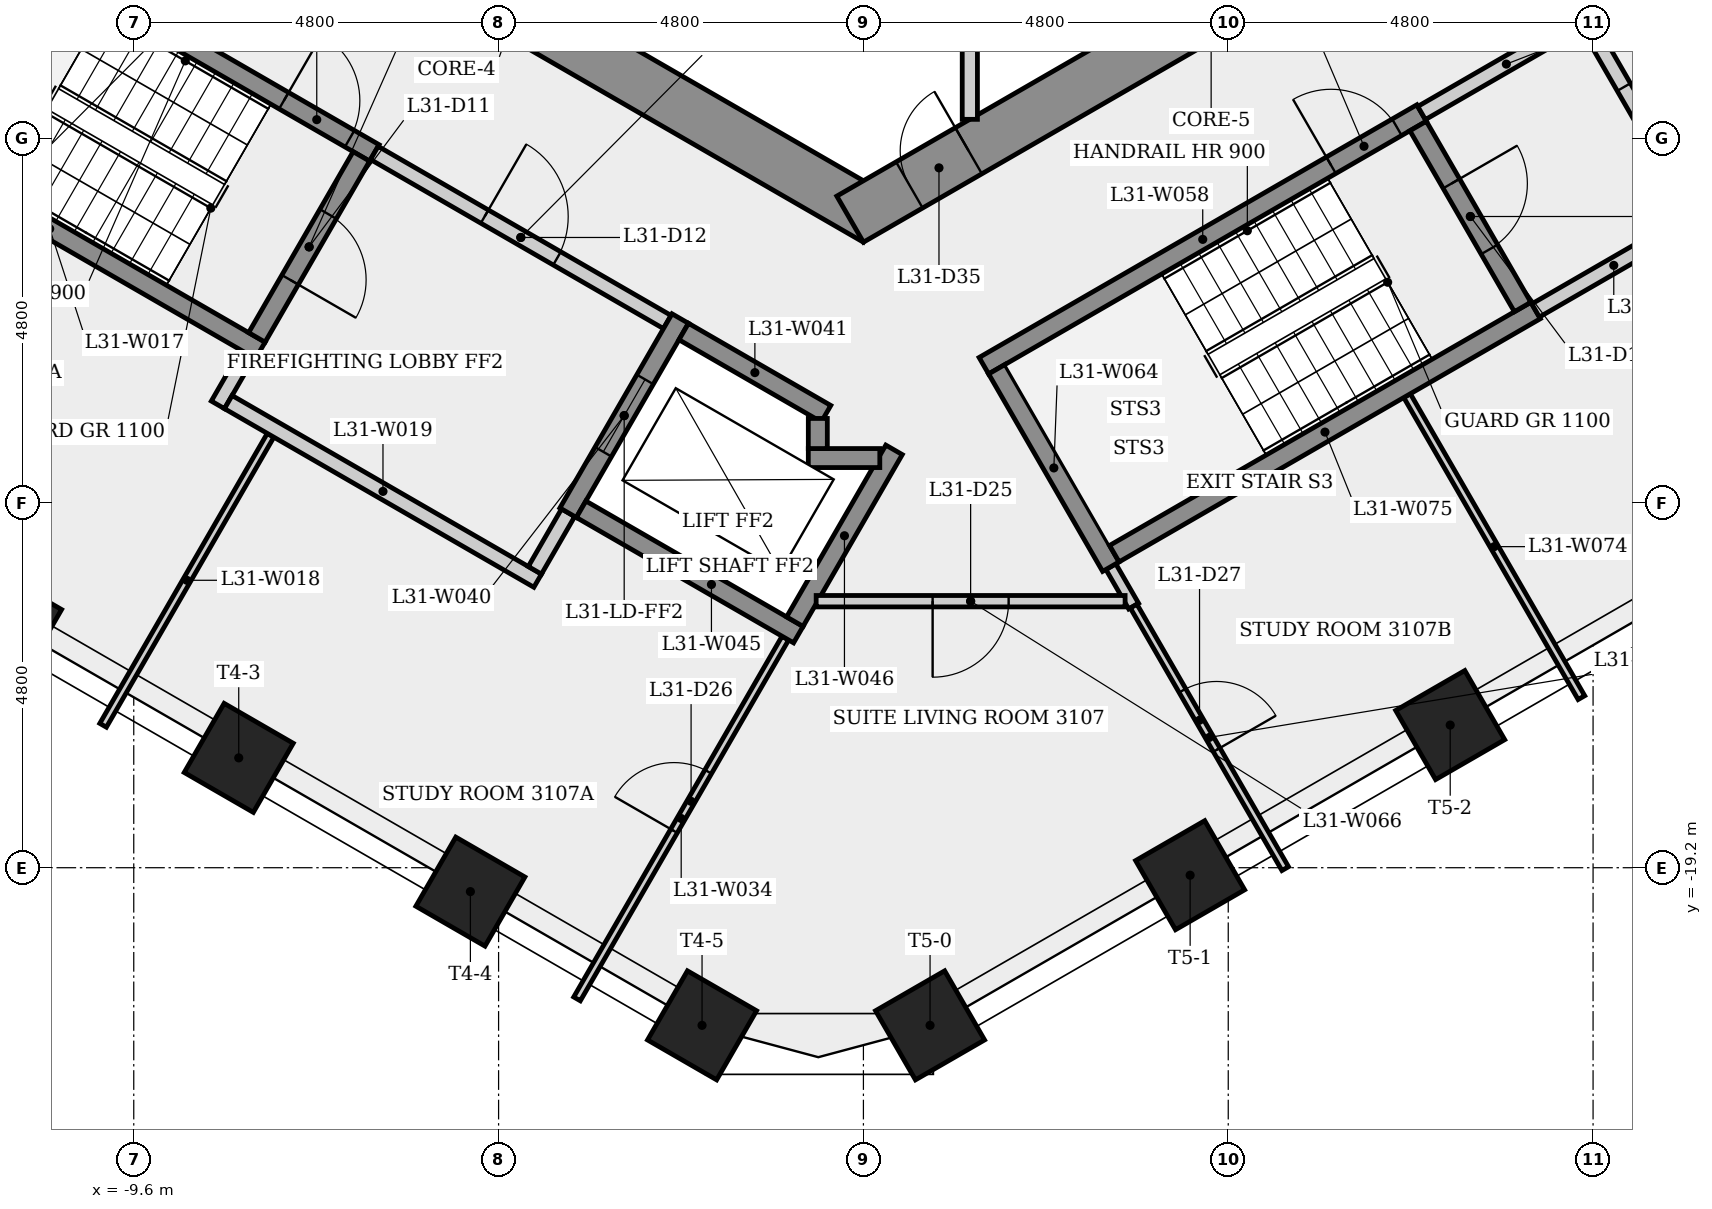
"""IFC4 building model, lengths in metres.
Left out: names, types, materials, properties, quantities, classifications, styles, units other than length and angle.
Written with IfcOpenShell. Run it as: python <this file> out.ifc"""

import sys

from ifc_helpers import new_model, si_unit, direction, frame, frame_2d, origin, origin_2d, place, context, subcontext, project, spatial, rectangle, extrude, element, fill, save


model = new_model("IFC4")
c1 = context("Model", 3, precision=1e-05, world=origin(), true_north=direction((0.0, 1.0)))
c2 = subcontext(c1, "Body", "Model", "MODEL_VIEW")
j1 = project(units=[si_unit("LENGTHUNIT", "METRE"), si_unit("PLANEANGLEUNIT", "RADIAN")], contexts=[c1])
p1 = place(None, origin())
s1 = spatial("IfcSite", under=j1, at=p1, CompositionType="ELEMENT")
p2 = place(p1, origin())
s2 = spatial("IfcBuilding", under=s1, at=p2, CompositionType="ELEMENT")
p3 = place(p2, frame((0.0, 0.0, 117.1)))
s3 = spatial("IfcBuildingStorey", under=s2, at=p3, CompositionType="ELEMENT", Elevation=117.1)
p4 = place(p3, frame((-9.325, -5.182, 0.0), z_axis=(0.0, 0.0, 1.0), x_axis=(0.866023993627, -0.500002442456, 0.0)))
e1 = element("IfcWall", 1, at=p4, inside=s3, PredefinedType="SHEAR", context=c2, shape_type="SweptSolid", body=[
    extrude(rectangle(XDim=10.97, YDim=0.7, at=frame_2d((5.485, 0.0))), origin(), (0.0, 0.0, 1.0), 3.4),
])
p5 = place(p4, frame((0.801, 0.0, 0.0)))
e2 = element("IfcOpeningElement", 2, at=p5, cuts=e1, PredefinedType="OPENING", context=c2, shape_type="SweptSolid", body=[
    extrude(rectangle(XDim=0.9, YDim=2.1, at=frame_2d((0.45, 1.05))), frame((0.0, 0.36, 0.0), z_axis=(0.0, -1.0, 0.0), x_axis=(1.0, 0.0, 0.0)), (0.0, 0.0, 1.0), 0.72),
])
p6 = place(p3, frame((-0.175, -10.667, 0.0), z_axis=(0.0, 0.0, 1.0), x_axis=(0.866023993627, 0.500002442456, 0.0)))
e3 = element("IfcWall", 3, at=p6, inside=s3, PredefinedType="SHEAR", context=c2, shape_type="SweptSolid", body=[
    extrude(rectangle(XDim=10.97, YDim=0.7, at=frame_2d((5.485, 0.0))), origin(), (0.0, 0.0, 1.0), 3.4),
])
p7 = place(p6, frame((0.9, 0.0, 0.0)))
e4 = element("IfcOpeningElement", 4, at=p7, cuts=e3, PredefinedType="OPENING", context=c2, shape_type="SweptSolid", body=[
    extrude(rectangle(XDim=0.9, YDim=2.1, at=frame_2d((0.45, 1.05))), frame((0.0, 0.36, 0.0), z_axis=(0.0, -1.0, 0.0), x_axis=(1.0, 0.0, 0.0)), (0.0, 0.0, 1.0), 0.72),
])
p8 = place(p6, frame((7.483, 0.0, 0.0)))
e5 = element("IfcOpeningElement", 5, at=p8, cuts=e3, PredefinedType="OPENING", context=c2, shape_type="SweptSolid", body=[
    extrude(rectangle(XDim=0.9, YDim=2.1, at=frame_2d((0.45, 1.05))), frame((0.0, 0.36, 0.0), z_axis=(0.0, -1.0, 0.0), x_axis=(1.0, 0.0, 0.0)), (0.0, 0.0, 1.0), 0.72),
])
for number, where, z_axis, x_axis in (
    (6, (-11.267, -15.995, 0.0), (0.0, 0.0, 1.0), (-0.5, -0.866, 0.0)),
    (7, (-8.219, -17.755, 0.0), (0.0, 0.0, 1.0), (-0.5, -0.866, 0.0)),
    (8, (-5.171, -19.514, 0.0), (0.0, 0.0, 1.0), (-0.5, -0.866, 0.0)),
    (9, (-2.123, -21.274, 0.0), (0.0, 0.0, 1.0), (-0.5, -0.866, 0.0)),
    (10, (0.877, -21.274, 0.0), (0.0, 0.0, 1.0), (0.5, -0.866, 0.0)),
    (11, (4.299, -19.299, 0.0), (0.0, 0.0, 1.0), (0.5, -0.866, 0.0)),
    (12, (7.72, -17.323, 0.0), (0.0, 0.0, 1.0), (0.5, -0.866, 0.0)),
):
    element("IfcColumn", number, at=place(p3, frame(where, z_axis=z_axis, x_axis=x_axis)), inside=s3, PredefinedType="COLUMN", context=c2, shape_type="SweptSolid", body=[
        extrude(rectangle(XDim=1.05, YDim=1.05, at=origin_2d()), origin(), (0.0, 0.0, 1.0), 3.4),
    ])
p9 = place(p3, frame((-11.977, -6.595, 0.0), z_axis=(0.0, 0.0, 1.0), x_axis=(0.866025499775, -0.499999833739, 0.0)))
e13 = element("IfcWall", 13, at=p9, inside=s3, PredefinedType="SHEAR", context=c2, shape_type="SweptSolid", body=[
    extrude(rectangle(XDim=6.4, YDim=0.25, at=frame_2d((3.2, 0.0))), origin(), (0.0, 0.0, 1.0), 3.0),
])
p10 = place(p9, frame((5.025, 0.0, 0.0)))
e14 = element("IfcOpeningElement", 14, at=p10, cuts=e13, PredefinedType="OPENING", context=c2, shape_type="SweptSolid", body=[
    extrude(rectangle(XDim=1.0, YDim=2.1, at=frame_2d((0.5, 1.05))), frame((0.0, 0.135, 0.0), z_axis=(0.0, -1.0, 0.0), x_axis=(1.0, 0.0, 0.0)), (0.0, 0.0, 1.0), 0.27),
])
p11 = place(p3, frame((-8.493, -13.11, 0.0), z_axis=(0.0, 0.0, 1.0), x_axis=(0.500067724834, 0.865986299303, 0.0)))
e15 = element("IfcWall", 15, at=p11, inside=s3, PredefinedType="PARTITIONING", context=c2, shape_type="SweptSolid", body=[
    extrude(rectangle(XDim=0.775, YDim=0.2, at=frame_2d((0.388, 0.0))), origin(), (0.0, 0.0, 1.0), 3.0),
])
p12 = place(p3, frame((-7.935, -12.393, 0.0), z_axis=(0.0, 0.0, 1.0), x_axis=(-0.866025499775, 0.499999833739, 0.0)))
e16 = element("IfcWall", 16, at=p12, inside=s3, PredefinedType="SHEAR", context=c2, shape_type="SweptSolid", body=[
    extrude(rectangle(XDim=6.4, YDim=0.25, at=frame_2d((3.2, 0.0))), origin(), (0.0, 0.0, 1.0), 3.0),
])
p13 = place(p3, frame((-7.8, -13.51, 0.0), z_axis=(0.0, 0.0, 1.0), x_axis=(-0.5000181976, -0.86601489714, 0.0)))
e17 = element("IfcWall", 17, at=p13, inside=s3, PredefinedType="PARTITIONING", context=c2, shape_type="SweptSolid", body=[
    extrude(rectangle(XDim=4.406, YDim=0.1, at=frame_2d((2.203, 0.0))), origin(), (0.0, 0.0, 1.0), 3.0),
])
p14 = place(p3, frame((-8.356, -13.073, 0.0), z_axis=(0.0, 0.0, 1.0), x_axis=(0.866038532462, -0.499977259774, 0.0)))
e18 = element("IfcWall", 18, at=p14, inside=s3, PredefinedType="PARTITIONING", context=c2, shape_type="SweptSolid", body=[
    extrude(rectangle(XDim=4.7, YDim=0.2, at=frame_2d((2.35, 0.0))), origin(), (0.0, 0.0, 1.0), 3.0),
])
p15 = place(p3, frame((-6.605, -9.841, 0.0), z_axis=(0.0, 0.0, 1.0), x_axis=(-0.499996545922, -0.866027397988, 0.0)))
e19 = element("IfcWall", 19, at=p15, inside=s3, PredefinedType="SHEAR", context=c2, shape_type="SweptSolid", body=[
    extrude(rectangle(XDim=2.75, YDim=0.25, at=frame_2d((1.375, 0.0))), origin(), (0.0, 0.0, 1.0), 3.0),
])
p16 = place(p15, frame((0.875, 0.0, 0.0)))
e20 = element("IfcOpeningElement", 20, at=p16, cuts=e19, PredefinedType="OPENING", context=c2, shape_type="SweptSolid", body=[
    extrude(rectangle(XDim=1.0, YDim=2.1, at=frame_2d((0.5, 1.05))), frame((0.0, 0.135, 0.0), z_axis=(0.0, -1.0, 0.0), x_axis=(1.0, 0.0, 0.0)), (0.0, 0.0, 1.0), 0.27),
])
p17 = place(p3, frame((-6.435, -9.795, 0.0), z_axis=(0.0, 0.0, 1.0), x_axis=(0.866012907634, -0.500021643343, 0.0)))
e21 = element("IfcWall", 21, at=p17, inside=s3, PredefinedType="PARTITIONING", context=c2, shape_type="SweptSolid", body=[
    extrude(rectangle(XDim=4.45, YDim=0.2, at=frame_2d((2.225, 0.0))), origin(), (0.0, 0.0, 1.0), 3.0),
])
p18 = place(p17, frame((1.675, 0.0, 0.0)))
e22 = element("IfcOpeningElement", 22, at=p18, cuts=e21, PredefinedType="OPENING", context=c2, shape_type="SweptSolid", body=[
    extrude(rectangle(XDim=1.1, YDim=2.1, at=frame_2d((0.55, 1.05))), frame((0.0, 0.11, 0.0), z_axis=(0.0, -1.0, 0.0), x_axis=(1.0, 0.0, 0.0)), (0.0, 0.0, 1.0), 0.22),
])
p19 = place(p3, frame((-3.885, -14.529, 0.0), z_axis=(0.0, 0.0, 1.0), x_axis=(-0.499859285417, -0.866106630146, 0.0)))
e23 = element("IfcWall", 23, at=p19, inside=s3, PredefinedType="PARTITIONING", context=c2, shape_type="SweptSolid", body=[
    extrude(rectangle(XDim=0.875, YDim=0.2, at=frame_2d((0.438, 0.0))), origin(), (0.0, 0.0, 1.0), 3.0),
])
p20 = place(p3, frame((-3.768, -20.926, 0.0), z_axis=(0.0, 0.0, 1.0), x_axis=(0.499980760091, 0.866036511666, 0.0)))
e24 = element("IfcWall", 24, at=p20, inside=s3, PredefinedType="PARTITIONING", context=c2, shape_type="SweptSolid", body=[
    extrude(rectangle(XDim=5.482, YDim=0.1, at=frame_2d((2.741, 0.0))), origin(), (0.0, 0.0, 1.0), 3.0),
])
p21 = place(p20, frame((2.551, 0.0, 0.0)))
e25 = element("IfcOpeningElement", 25, at=p21, cuts=e24, PredefinedType="OPENING", context=c2, shape_type="SweptSolid", body=[
    extrude(rectangle(XDim=0.9, YDim=2.1, at=frame_2d((0.45, 1.05))), frame((0.0, 0.06, 0.0), z_axis=(0.0, -1.0, 0.0), x_axis=(1.0, 0.0, 0.0)), (0.0, 0.0, 1.0), 0.12),
])
p22 = place(p3, frame((-2.41, -11.974, 0.0), z_axis=(0.0, 0.0, 1.0), x_axis=(-0.500001826776, -0.866024349092, 0.0)))
e26 = element("IfcWall", 26, at=p22, inside=s3, PredefinedType="SHEAR", context=c2, shape_type="SweptSolid", body=[
    extrude(rectangle(XDim=2.95, YDim=0.25, at=frame_2d((1.475, 0.0))), origin(), (0.0, 0.0, 1.0), 3.0),
])
p23 = place(p22, frame((0.925, 0.0, 0.0)))
e27 = element("IfcOpeningElement", 27, at=p23, cuts=e26, PredefinedType="OPENING", context=c2, shape_type="SweptSolid", body=[
    extrude(rectangle(XDim=1.1, YDim=2.1, at=frame_2d((0.55, 1.05))), frame((0.0, 0.135, 0.0), z_axis=(0.0, -1.0, 0.0), x_axis=(1.0, 0.0, 0.0)), (0.0, 0.0, 1.0), 0.27),
])
p24 = place(p3, frame((-2.364, -12.145, 0.0), z_axis=(0.0, 0.0, 1.0), x_axis=(0.86603892542, -0.499976579108, 0.0)))
e28 = element("IfcWall", 28, at=p24, inside=s3, PredefinedType="SHEAR", context=c2, shape_type="SweptSolid", body=[
    extrude(rectangle(XDim=2.162, YDim=0.25, at=frame_2d((1.081, 0.0))), origin(), (0.0, 0.0, 1.0), 3.0),
])
p25 = place(p3, frame((-0.856, -16.133, 0.0), z_axis=(0.0, 0.0, 1.0), x_axis=(-0.866021716278, 0.500006386895, 0.0)))
e29 = element("IfcWall", 29, at=p25, inside=s3, PredefinedType="SHEAR", context=c2, shape_type="SweptSolid", body=[
    extrude(rectangle(XDim=3.3, YDim=0.25, at=frame_2d((1.65, 0.0))), origin(), (0.0, 0.0, 1.0), 3.0),
])
p26 = place(p3, frame((-0.902, -15.962, 0.0), z_axis=(0.0, 0.0, 1.0), x_axis=(0.499981517636, 0.866036074319, 0.0)))
e30 = element("IfcWall", 30, at=p26, inside=s3, PredefinedType="SHEAR", context=c2, shape_type="SweptSolid", body=[
    extrude(rectangle(XDim=2.61, YDim=0.25, at=frame_2d((1.305, 0.0))), origin(), (0.0, 0.0, 1.0), 3.0),
])
p27 = place(p3, frame((-0.725, -13.81, 0.0), z_axis=(0.0, 0.0, 1.0), x_axis=(1.0, 0.0, 0.0)))
e31 = element("IfcWall", 31, at=p27, inside=s3, PredefinedType="SHEAR", context=c2, shape_type="SweptSolid", body=[
    extrude(rectangle(XDim=0.941, YDim=0.25, at=frame_2d((0.47, 0.0))), origin(), (0.0, 0.0, 1.0), 3.4),
])
p28 = place(p3, frame((-0.6, -13.289, 0.0), z_axis=(0.0, 0.0, 1.0), x_axis=(0.0, -1.0, 0.0)))
e32 = element("IfcWall", 32, at=p28, inside=s3, PredefinedType="SHEAR", context=c2, shape_type="SweptSolid", body=[
    extrude(rectangle(XDim=0.396, YDim=0.25, at=frame_2d((0.198, 0.0))), origin(), (0.0, 0.0, 1.0), 3.4),
])
p29 = place(p3, frame((1.4, -5.275, 0.0), z_axis=(0.0, 0.0, 1.0), x_axis=(0.0, -1.0, 0.0)))
e33 = element("IfcWall", 33, at=p29, inside=s3, PredefinedType="PARTITIONING", context=c2, shape_type="SweptSolid", body=[
    extrude(rectangle(XDim=4.078, YDim=0.2, at=frame_2d((2.039, 0.0))), origin(), (0.0, 0.0, 1.0), 3.0),
])
p30 = place(p3, frame((1.585, -12.595, 0.0), z_axis=(0.0, 0.0, 1.0), x_axis=(0.866036417653, 0.499980922934, 0.0)))
e34 = element("IfcWall", 34, at=p30, inside=s3, PredefinedType="SHEAR", context=c2, shape_type="SweptSolid", body=[
    extrude(rectangle(XDim=6.65, YDim=0.25, at=frame_2d((3.325, 0.0))), origin(), (0.0, 0.0, 1.0), 3.0),
])
p31 = place(p30, frame((5.275, 0.0, 0.0)))
e35 = element("IfcOpeningElement", 35, at=p31, cuts=e34, PredefinedType="OPENING", context=c2, shape_type="SweptSolid", body=[
    extrude(rectangle(XDim=1.0, YDim=2.1, at=frame_2d((0.5, 1.05))), frame((0.0, 0.135, 0.0), z_axis=(0.0, -1.0, 0.0), x_axis=(1.0, 0.0, 0.0)), (0.0, 0.0, 1.0), 0.27),
])
p32 = place(p3, frame((3.256, -15.239, 0.0), z_axis=(0.0, 0.0, 1.0), x_axis=(0.499816412211, -0.866131372301, 0.0)))
e36 = element("IfcWall", 36, at=p32, inside=s3, PredefinedType="PARTITIONING", context=c2, shape_type="SweptSolid", body=[
    extrude(rectangle(XDim=0.6, YDim=0.15, at=frame_2d((0.3, 0.0))), origin(), (0.0, 0.0, 1.0), 3.0),
])
p33 = place(p3, frame((3.256, -15.239, 0.0), z_axis=(0.0, 0.0, 1.0), x_axis=(-0.50002537861, 0.866010750942, 0.0)))
e37 = element("IfcWall", 37, at=p33, inside=s3, PredefinedType="SHEAR", context=c2, shape_type="SweptSolid", body=[
    extrude(rectangle(XDim=3.0, YDim=0.25, at=frame_2d((1.5, 0.0))), origin(), (0.0, 0.0, 1.0), 3.0),
])
p34 = place(p3, frame((3.443, -15.693, 0.0), z_axis=(0.0, 0.0, 1.0), x_axis=(-1.0, 0.0, 0.0)))
e38 = element("IfcWall", 38, at=p34, inside=s3, PredefinedType="PARTITIONING", context=c2, shape_type="SweptSolid", body=[
    extrude(rectangle(XDim=4.064, YDim=0.15, at=frame_2d((2.032, 0.0))), origin(), (0.0, 0.0, 1.0), 3.0),
])
p35 = place(p34, frame((1.532, 0.0, 0.0)))
e39 = element("IfcOpeningElement", 39, at=p35, cuts=e38, PredefinedType="OPENING", context=c2, shape_type="SweptSolid", body=[
    extrude(rectangle(XDim=1.0, YDim=2.1, at=frame_2d((0.5, 1.05))), frame((0.0, 0.085, 0.0), z_axis=(0.0, -1.0, 0.0), x_axis=(1.0, 0.0, 0.0)), (0.0, 0.0, 1.0), 0.17),
])
p36 = place(p3, frame((3.555, -15.758, 0.0), z_axis=(0.0, 0.0, 1.0), x_axis=(0.500010364181, -0.866019419939, 0.0)))
e40 = element("IfcWall", 40, at=p36, inside=s3, PredefinedType="PARTITIONING", context=c2, shape_type="SweptSolid", body=[
    extrude(rectangle(XDim=3.988, YDim=0.1, at=frame_2d((1.994, 0.0))), origin(), (0.0, 0.0, 1.0), 3.0),
])
p37 = place(p36, frame((1.284, 0.0, 0.0)))
e41 = element("IfcOpeningElement", 41, at=p37, cuts=e40, PredefinedType="OPENING", context=c2, shape_type="SweptSolid", body=[
    extrude(rectangle(XDim=0.9, YDim=2.1, at=frame_2d((0.45, 1.05))), frame((0.0, 0.06, 0.0), z_axis=(0.0, -1.0, 0.0), x_axis=(1.0, 0.0, 0.0)), (0.0, 0.0, 1.0), 0.12),
])
p38 = place(p3, frame((7.153, -12.989, 0.0), z_axis=(0.0, 0.0, 1.0), x_axis=(0.500024917322, -0.866011017284, 0.0)))
e42 = element("IfcWall", 42, at=p38, inside=s3, PredefinedType="PARTITIONING", context=c2, shape_type="SweptSolid", body=[
    extrude(rectangle(XDim=4.588, YDim=0.1, at=frame_2d((2.294, 0.0))), origin(), (0.0, 0.0, 1.0), 3.0),
])
p39 = place(p3, frame((3.301, -15.068, 0.0), z_axis=(0.0, 0.0, 1.0), x_axis=(0.866035036182, 0.499983315828, 0.0)))
e43 = element("IfcWall", 43, at=p39, inside=s3, PredefinedType="SHEAR", context=c2, shape_type="SweptSolid", body=[
    extrude(rectangle(XDim=6.4, YDim=0.25, at=frame_2d((3.2, 0.0))), origin(), (0.0, 0.0, 1.0), 3.0),
])
p40 = place(p3, frame((7.298, -9.441, 0.0), z_axis=(0.0, 0.0, 1.0), x_axis=(0.500034990121, -0.866005201286, 0.0)))
e44 = element("IfcWall", 44, at=p40, inside=s3, PredefinedType="SHEAR", context=c2, shape_type="SweptSolid", body=[
    extrude(rectangle(XDim=2.75, YDim=0.25, at=frame_2d((1.375, 0.0))), origin(), (0.0, 0.0, 1.0), 3.0),
])
p41 = place(p40, frame((0.875, 0.0, 0.0)))
e45 = element("IfcOpeningElement", 45, at=p41, cuts=e44, PredefinedType="OPENING", context=c2, shape_type="SweptSolid", body=[
    extrude(rectangle(XDim=1.0, YDim=2.1, at=frame_2d((0.5, 1.05))), frame((0.0, 0.135, 0.0), z_axis=(0.0, -1.0, 0.0), x_axis=(1.0, 0.0, 0.0)), (0.0, 0.0, 1.0), 0.27),
])
p42 = place(p3, frame((7.344, -9.27, 0.0), z_axis=(0.0, 0.0, 1.0), x_axis=(0.866005588531, 0.500034319456, 0.0)))
e46 = element("IfcWall", 46, at=p42, inside=s3, PredefinedType="PARTITIONING", context=c2, shape_type="SweptSolid", body=[
    extrude(rectangle(XDim=2.575, YDim=0.2, at=frame_2d((1.288, 0.0))), origin(), (0.0, 0.0, 1.0), 3.0),
])
p43 = place(p3, frame((9.537, -8.119, 0.0), z_axis=(0.0, 0.0, 1.0), x_axis=(0.499990139034, -0.866031096941, 0.0)))
e47 = element("IfcWall", 47, at=p43, inside=s3, PredefinedType="PARTITIONING", context=c2, shape_type="SweptSolid", body=[
    extrude(rectangle(XDim=3.0, YDim=0.2, at=frame_2d((1.5, 0.0))), origin(), (0.0, 0.0, 1.0), 3.0),
])
p44 = place(p43, frame((0.935, 0.0, 0.0)))
e48 = element("IfcOpeningElement", 48, at=p44, cuts=e47, PredefinedType="OPENING", context=c2, shape_type="SweptSolid", body=[
    extrude(rectangle(XDim=1.0, YDim=2.1, at=frame_2d((0.5, 1.05))), frame((0.0, 0.11, 0.0), z_axis=(0.0, -1.0, 0.0), x_axis=(1.0, 0.0, 0.0)), (0.0, 0.0, 1.0), 0.22),
])
p45 = place(p3, frame((10.901, -10.681, 0.0), z_axis=(0.0, 0.0, 1.0), x_axis=(-0.866007538022, -0.500030943131, 0.0)))
e49 = element("IfcWall", 49, at=p45, inside=s3, PredefinedType="PARTITIONING", context=c2, shape_type="SweptSolid", body=[
    extrude(rectangle(XDim=2.375, YDim=0.2, at=frame_2d((1.188, 0.0))), origin(), (0.0, 0.0, 1.0), 3.0),
])
p46 = place(p10, origin())
e50 = element("IfcDoor", 50, at=p46, inside=s3, OperationType="SINGLE_SWING_LEFT", PredefinedType="DOOR", context=c2, shape_type="SweptSolid", body=[
    extrude(rectangle(XDim=1.0, YDim=2.1, at=frame_2d((0.5, 1.05))), frame((0.0, 0.025, 0.0), z_axis=(0.0, -1.0, 0.0), x_axis=(1.0, 0.0, 0.0)), (0.0, 0.0, 1.0), 0.05),
])
fill(e14, e50)
p47 = place(p16, origin())
e51 = element("IfcDoor", 51, at=p47, inside=s3, OperationType="SINGLE_SWING_RIGHT", PredefinedType="DOOR", context=c2, shape_type="SweptSolid", body=[
    extrude(rectangle(XDim=1.0, YDim=2.1, at=frame_2d((0.5, 1.05))), frame((0.0, 0.025, 0.0), z_axis=(0.0, -1.0, 0.0), x_axis=(1.0, 0.0, 0.0)), (0.0, 0.0, 1.0), 0.05),
])
fill(e20, e51)
p48 = place(p18, origin())
e52 = element("IfcDoor", 52, at=p48, inside=s3, OperationType="SINGLE_SWING_LEFT", PredefinedType="DOOR", context=c2, shape_type="SweptSolid", body=[
    extrude(rectangle(XDim=1.1, YDim=2.1, at=frame_2d((0.55, 1.05))), frame((0.0, 0.025, 0.0), z_axis=(0.0, -1.0, 0.0), x_axis=(1.0, 0.0, 0.0)), (0.0, 0.0, 1.0), 0.05),
])
fill(e22, e52)
p49 = place(p23, origin())
e53 = element("IfcDoor", 53, at=p49, inside=s3, OperationType="SLIDING_TO_LEFT", PredefinedType="DOOR", context=c2, shape_type="SweptSolid", body=[
    extrude(rectangle(XDim=1.1, YDim=2.1, at=frame_2d((0.55, 1.05))), frame((0.0, 0.025, 0.0), z_axis=(0.0, -1.0, 0.0), x_axis=(1.0, 0.0, 0.0)), (0.0, 0.0, 1.0), 0.05),
])
fill(e27, e53)
p50 = place(p31, origin())
e54 = element("IfcDoor", 54, at=p50, inside=s3, OperationType="SINGLE_SWING_LEFT", PredefinedType="DOOR", context=c2, shape_type="SweptSolid", body=[
    extrude(rectangle(XDim=1.0, YDim=2.1, at=frame_2d((0.5, 1.05))), frame((0.0, 0.025, 0.0), z_axis=(0.0, -1.0, 0.0), x_axis=(1.0, 0.0, 0.0)), (0.0, 0.0, 1.0), 0.05),
])
fill(e35, e54)
p51 = place(p44, origin())
e55 = element("IfcDoor", 55, at=p51, inside=s3, OperationType="SINGLE_SWING_RIGHT", PredefinedType="DOOR", context=c2, shape_type="SweptSolid", body=[
    extrude(rectangle(XDim=1.0, YDim=2.1, at=frame_2d((0.5, 1.05))), frame((0.0, 0.025, 0.0), z_axis=(0.0, -1.0, 0.0), x_axis=(1.0, 0.0, 0.0)), (0.0, 0.0, 1.0), 0.05),
])
fill(e48, e55)
p52 = place(p41, origin())
e56 = element("IfcDoor", 56, at=p52, inside=s3, OperationType="SINGLE_SWING_LEFT", PredefinedType="DOOR", context=c2, shape_type="SweptSolid", body=[
    extrude(rectangle(XDim=1.0, YDim=2.1, at=frame_2d((0.5, 1.05))), frame((0.0, 0.025, 0.0), z_axis=(0.0, -1.0, 0.0), x_axis=(1.0, 0.0, 0.0)), (0.0, 0.0, 1.0), 0.05),
])
fill(e45, e56)
p53 = place(p35, origin())
e57 = element("IfcDoor", 57, at=p53, inside=s3, OperationType="SINGLE_SWING_RIGHT", PredefinedType="DOOR", context=c2, shape_type="SweptSolid", body=[
    extrude(rectangle(XDim=1.0, YDim=2.1, at=frame_2d((0.5, 1.05))), frame((0.0, 0.025, 0.0), z_axis=(0.0, -1.0, 0.0), x_axis=(1.0, 0.0, 0.0)), (0.0, 0.0, 1.0), 0.05),
])
fill(e39, e57)
p54 = place(p21, origin())
e58 = element("IfcDoor", 58, at=p54, inside=s3, OperationType="SINGLE_SWING_LEFT", PredefinedType="DOOR", context=c2, shape_type="SweptSolid", body=[
    extrude(rectangle(XDim=0.9, YDim=2.1, at=frame_2d((0.45, 1.05))), frame((0.0, 0.025, 0.0), z_axis=(0.0, -1.0, 0.0), x_axis=(1.0, 0.0, 0.0)), (0.0, 0.0, 1.0), 0.05),
])
fill(e25, e58)
p55 = place(p37, origin())
e59 = element("IfcDoor", 59, at=p55, inside=s3, OperationType="SINGLE_SWING_RIGHT", PredefinedType="DOOR", context=c2, shape_type="SweptSolid", body=[
    extrude(rectangle(XDim=0.9, YDim=2.1, at=frame_2d((0.45, 1.05))), frame((0.0, 0.025, 0.0), z_axis=(0.0, -1.0, 0.0), x_axis=(1.0, 0.0, 0.0)), (0.0, 0.0, 1.0), 0.05),
])
fill(e41, e59)
p56 = place(p7, origin())
e60 = element("IfcDoor", 60, at=p56, inside=s3, OperationType="SINGLE_SWING_RIGHT", PredefinedType="DOOR", context=c2, shape_type="SweptSolid", body=[
    extrude(rectangle(XDim=0.9, YDim=2.1, at=frame_2d((0.45, 1.05))), frame((0.0, 0.025, 0.0), z_axis=(0.0, -1.0, 0.0), x_axis=(1.0, 0.0, 0.0)), (0.0, 0.0, 1.0), 0.05),
])
fill(e4, e60)
save(model, sys.argv[1])
